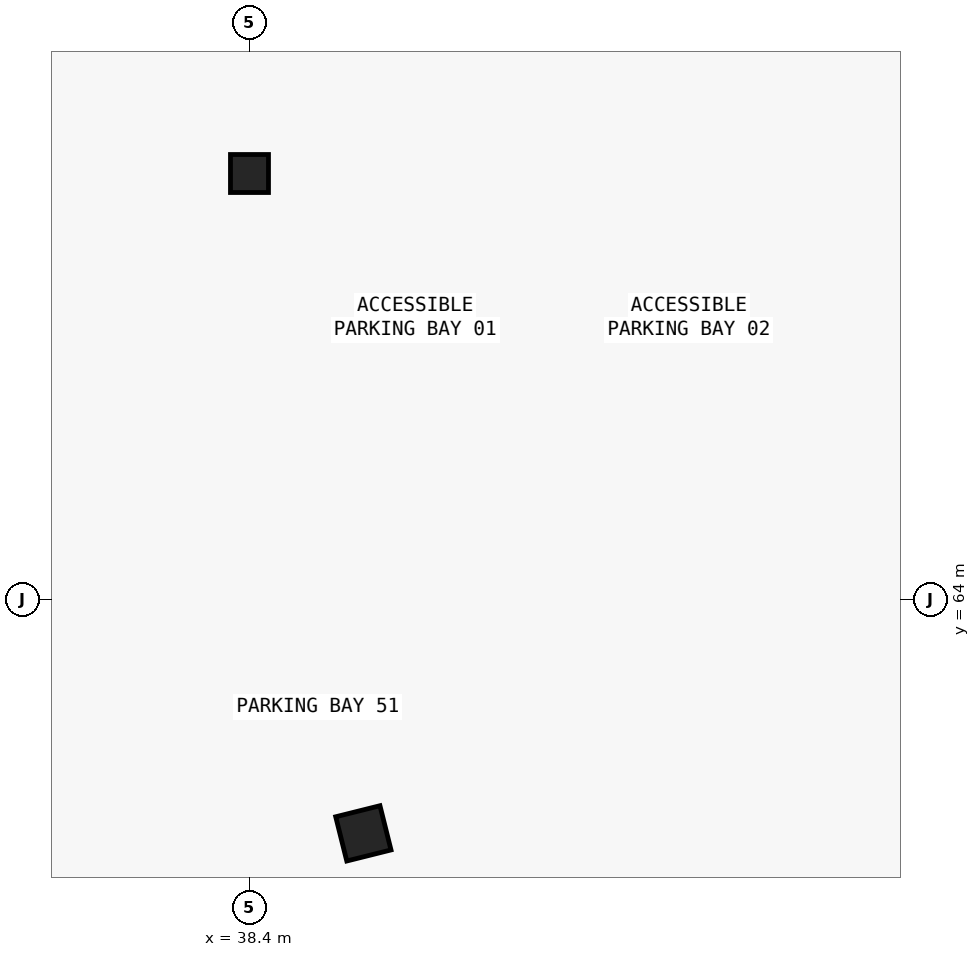
"""IFC4 building model, lengths in metres.
Left out: names, types, materials, properties, quantities, classifications, styles, units other than length and angle.
Written with IfcOpenShell. Run it as: python <this file> out.ifc"""

import sys

from ifc_helpers import new_model, si_unit, direction, frame, origin, origin_2d, place, context, subcontext, project, spatial, rectangle, extrude, element, save


model = new_model("IFC4")
c1 = context("Model", 3, precision=1e-05, world=origin(), true_north=direction((0.0, 1.0)))
c2 = subcontext(c1, "Body", "Model", "MODEL_VIEW")
j1 = project(units=[si_unit("LENGTHUNIT", "METRE"), si_unit("PLANEANGLEUNIT", "RADIAN")], contexts=[c1])
p1 = place(None, origin())
s1 = spatial("IfcSite", under=j1, at=p1, CompositionType="ELEMENT")
p2 = place(p1, origin())
s2 = spatial("IfcBuilding", under=s1, at=p2, CompositionType="ELEMENT")
p3 = place(p2, frame((0.0, 0.0, -4.55)))
s3 = spatial("IfcBuildingStorey", under=s2, at=p3, CompositionType="ELEMENT", Elevation=-4.55)
p4 = place(p3, frame((38.4, 69.6, 0.0), z_axis=(0.0, 0.0, 1.0), x_axis=(1.0, 0.0, 0.0)))
e1 = element("IfcColumn", 1, at=p4, inside=s3, PredefinedType="COLUMN", context=c2, shape_type="SweptSolid", body=[
    extrude(rectangle(XDim=0.5, YDim=0.5, at=origin_2d()), origin(), (0.0, 0.0, 1.0), 4.55),
])
p5 = place(p3, frame((39.898, 60.918, 0.0), z_axis=(0.0, 0.0, 1.0), x_axis=(0.970142500145, 0.242535625038, 0.0)))
e2 = element("IfcColumn", 2, at=p5, inside=s3, PredefinedType="COLUMN", context=c2, shape_type="SweptSolid", body=[
    extrude(rectangle(XDim=0.6, YDim=0.6, at=origin_2d()), origin(), (0.0, 0.0, 1.0), 4.55),
])
save(model, sys.argv[1])
